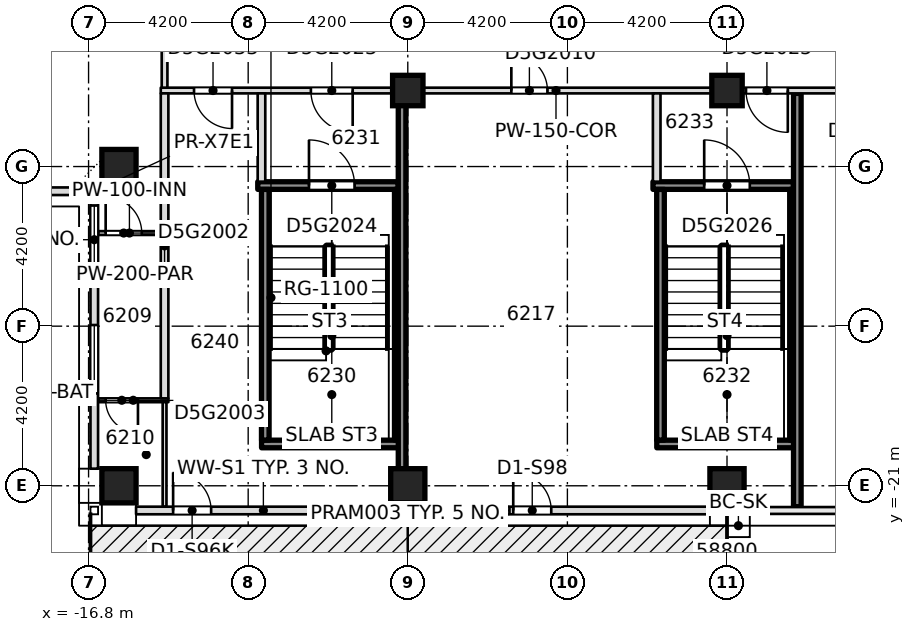
"""IFC4 building model, lengths in metres.
Left out: names, types, materials, properties, quantities, classifications, styles, units other than length and angle.
Written with IfcOpenShell. Run it as: python <this file> out.ifc"""

import sys

from ifc_helpers import new_model, si_unit, direction, frame, frame_2d, origin, origin_2d, place, context, subcontext, project, spatial, rectangle, extrude, element, fill, save


model = new_model("IFC4")
c1 = context("Model", 3, precision=1e-05, world=origin(), true_north=direction((0.0, 1.0)))
c2 = subcontext(c1, "Body", "Model", "MODEL_VIEW")
j1 = project(units=[si_unit("LENGTHUNIT", "METRE"), si_unit("PLANEANGLEUNIT", "RADIAN")], contexts=[c1])
p1 = place(None, origin())
s1 = spatial("IfcSite", under=j1, at=p1, CompositionType="ELEMENT")
p2 = place(p1, origin())
s2 = spatial("IfcBuilding", under=s1, at=p2, CompositionType="ELEMENT")
p3 = place(p2, frame((0.0, 0.0, 237.25)))
s3 = spatial("IfcBuildingStorey", under=s2, at=p3, CompositionType="ELEMENT", Elevation=237.25)
for number, where, z_axis, x_axis in (
    (1, (-16.0, -21.0, -0.4), (0.0, 0.0, 1.0), (1.0, 0.0, 0.0)),
    (2, (-8.4, -21.0, -0.4), (0.0, 0.0, 1.0), (1.0, 0.0, 0.0)),
    (3, (0.0, -21.0, -0.4), (0.0, 0.0, 1.0), (1.0, 0.0, 0.0)),
    (4, (-16.0, -12.6, -0.4), (0.0, 0.0, 1.0), (1.0, 0.0, 0.0)),
):
    element("IfcColumn", number, at=place(p3, frame(where, z_axis=z_axis, x_axis=x_axis)), inside=s3, PredefinedType="COLUMN", context=c2, shape_type="SweptSolid", body=[
        extrude(rectangle(XDim=0.9, YDim=0.9, at=origin_2d()), origin(), (0.0, 0.0, 1.0), 3.45),
    ])
for number, where, z_axis, x_axis in (
    (5, (-8.4, -10.6, -0.4), (0.0, 0.0, 1.0), (1.0, 0.0, 0.0)),
    (6, (0.0, -10.6, -0.4), (0.0, 0.0, 1.0), (1.0, 0.0, 0.0)),
):
    element("IfcColumn", number, at=place(p3, frame(where, z_axis=z_axis, x_axis=x_axis)), inside=s3, PredefinedType="COLUMN", context=c2, shape_type="SweptSolid", body=[
        extrude(rectangle(XDim=0.8, YDim=0.8, at=origin_2d()), origin(), (0.0, 0.0, 1.0), 3.45),
    ])
p4 = place(p3, frame((-12.248, -19.9, 0.0), z_axis=(0.0, 0.0, 1.0), x_axis=(1.0, 0.0, 0.0)))
e7 = element("IfcWall", 7, at=p4, inside=s3, PredefinedType="SOLIDWALL", context=c2, shape_type="SweptSolid", body=[
    extrude(rectangle(XDim=3.696, YDim=0.2, at=frame_2d((1.848, 0.0))), origin(), (0.0, 0.0, 1.0), 3.05),
])
p5 = place(p3, frame((-1.848, -19.9, 0.0), z_axis=(0.0, 0.0, 1.0), x_axis=(1.0, 0.0, 0.0)))
e8 = element("IfcWall", 8, at=p5, inside=s3, PredefinedType="SOLIDWALL", context=c2, shape_type="SweptSolid", body=[
    extrude(rectangle(XDim=3.696, YDim=0.2, at=frame_2d((1.848, 0.0))), origin(), (0.0, 0.0, 1.0), 3.05),
])
p6 = place(p3, frame((-16.55, -18.75, 0.0), z_axis=(0.0, 0.0, 1.0), x_axis=(1.0, 0.0, 0.0)))
e9 = element("IfcWall", 9, at=p6, inside=s3, PredefinedType="PARTITIONING", context=c2, shape_type="SweptSolid", body=[
    extrude(rectangle(XDim=1.85, YDim=0.1, at=frame_2d((0.925, 0.0))), origin(), (0.0, 0.0, 1.0), 3.05),
])
p7 = place(p6, frame((0.2, 0.0, 0.0)))
e10 = element("IfcOpeningElement", 10, at=p7, cuts=e9, PredefinedType="OPENING", context=c2, shape_type="SweptSolid", body=[
    extrude(rectangle(XDim=0.85, YDim=2.1, at=frame_2d((0.425, 1.05))), frame((0.0, 0.06, 0.0), z_axis=(0.0, -1.0, 0.0), x_axis=(1.0, 0.0, 0.0)), (0.0, 0.0, 1.0), 0.12),
])
p8 = place(p3, frame((-16.55, -14.35, 0.0), z_axis=(0.0, 0.0, 1.0), x_axis=(1.0, 0.0, 0.0)))
e11 = element("IfcWall", 11, at=p8, inside=s3, PredefinedType="PARTITIONING", context=c2, shape_type="SweptSolid", body=[
    extrude(rectangle(XDim=1.65, YDim=0.1, at=frame_2d((0.825, 0.0))), origin(), (0.0, 0.0, 1.0), 3.05),
])
p9 = place(p8, frame((0.2, 0.0, 0.0)))
e12 = element("IfcOpeningElement", 12, at=p9, cuts=e11, PredefinedType="OPENING", context=c2, shape_type="SweptSolid", body=[
    extrude(rectangle(XDim=0.95, YDim=2.1, at=frame_2d((0.475, 1.05))), frame((0.0, 0.06, 0.0), z_axis=(0.0, -1.0, 0.0), x_axis=(1.0, 0.0, 0.0)), (0.0, 0.0, 1.0), 0.12),
])
p10 = place(p3, frame((-12.348, -13.1, 0.0), z_axis=(0.0, 0.0, 1.0), x_axis=(1.0, 0.0, 0.0)))
e13 = element("IfcWall", 13, at=p10, inside=s3, PredefinedType="SOLIDWALL", context=c2, shape_type="SweptSolid", body=[
    extrude(rectangle(XDim=3.696, YDim=0.2, at=frame_2d((1.848, 0.0))), origin(), (0.0, 0.0, 1.0), 3.05),
])
p11 = place(p10, frame((1.348, 0.0, 0.0)))
e14 = element("IfcOpeningElement", 14, at=p11, cuts=e13, PredefinedType="OPENING", context=c2, shape_type="SweptSolid", body=[
    extrude(rectangle(XDim=1.2, YDim=2.1, at=frame_2d((0.6, 1.05))), frame((0.0, 0.11, 0.0), z_axis=(0.0, -1.0, 0.0), x_axis=(1.0, 0.0, 0.0)), (0.0, 0.0, 1.0), 0.22),
])
p12 = place(p3, frame((-1.948, -13.1, 0.0), z_axis=(0.0, 0.0, 1.0), x_axis=(1.0, 0.0, 0.0)))
e15 = element("IfcWall", 15, at=p12, inside=s3, PredefinedType="SOLIDWALL", context=c2, shape_type="SweptSolid", body=[
    extrude(rectangle(XDim=3.696, YDim=0.2, at=frame_2d((1.848, 0.0))), origin(), (0.0, 0.0, 1.0), 3.05),
])
p13 = place(p12, frame((1.348, 0.0, 0.0)))
e16 = element("IfcOpeningElement", 16, at=p13, cuts=e15, PredefinedType="OPENING", context=c2, shape_type="SweptSolid", body=[
    extrude(rectangle(XDim=1.2, YDim=2.1, at=frame_2d((0.6, 1.05))), frame((0.0, 0.11, 0.0), z_axis=(0.0, -1.0, 0.0), x_axis=(1.0, 0.0, 0.0)), (0.0, 0.0, 1.0), 0.22),
])
p14 = place(p3, frame((-14.9, -10.6, 0.0), z_axis=(0.0, 0.0, 1.0), x_axis=(1.0, 0.0, 0.0)))
e17 = element("IfcWall", 17, at=p14, inside=s3, PredefinedType="PARTITIONING", context=c2, shape_type="SweptSolid", body=[
    extrude(rectangle(XDim=20.8, YDim=0.15, at=frame_2d((10.4, 0.0))), origin(), (0.0, 0.0, 1.0), 3.05),
])
p15 = place(p14, frame((9.225, 0.0, 0.0)))
e18 = element("IfcOpeningElement", 18, at=p15, cuts=e17, PredefinedType="OPENING", context=c2, shape_type="SweptSolid", body=[
    extrude(rectangle(XDim=0.95, YDim=2.1, at=frame_2d((0.475, 1.05))), frame((0.0, 0.085, 0.0), z_axis=(0.0, -1.0, 0.0), x_axis=(1.0, 0.0, 0.0)), (0.0, 0.0, 1.0), 0.17),
])
p16 = place(p14, frame((18.275, 0.0, 0.0)))
e19 = element("IfcOpeningElement", 19, at=p16, cuts=e17, PredefinedType="OPENING", context=c2, shape_type="SweptSolid", body=[
    extrude(rectangle(XDim=0.95, YDim=2.1, at=frame_2d((0.475, 1.05))), frame((0.0, 0.085, 0.0), z_axis=(0.0, -1.0, 0.0), x_axis=(1.0, 0.0, 0.0)), (0.0, 0.0, 1.0), 0.17),
])
p17 = place(p14, frame((3.95, 0.0, 0.0)))
e20 = element("IfcOpeningElement", 20, at=p17, cuts=e17, PredefinedType="OPENING", context=c2, shape_type="SweptSolid", body=[
    extrude(rectangle(XDim=1.1, YDim=2.1, at=frame_2d((0.55, 1.05))), frame((0.0, 0.085, 0.0), z_axis=(0.0, -1.0, 0.0), x_axis=(1.0, 0.0, 0.0)), (0.0, 0.0, 1.0), 0.17),
])
p18 = place(p14, frame((15.4, 0.0, 0.0)))
e21 = element("IfcOpeningElement", 21, at=p18, cuts=e17, PredefinedType="OPENING", context=c2, shape_type="SweptSolid", body=[
    extrude(rectangle(XDim=1.1, YDim=2.1, at=frame_2d((0.55, 1.05))), frame((0.0, 0.085, 0.0), z_axis=(0.0, -1.0, 0.0), x_axis=(1.0, 0.0, 0.0)), (0.0, 0.0, 1.0), 0.17),
])
p19 = place(p14, frame((0.875, 0.0, 0.0)))
e22 = element("IfcOpeningElement", 22, at=p19, cuts=e17, PredefinedType="OPENING", context=c2, shape_type="SweptSolid", body=[
    extrude(rectangle(XDim=1.0, YDim=2.1, at=frame_2d((0.5, 1.05))), frame((0.0, 0.085, 0.0), z_axis=(0.0, -1.0, 0.0), x_axis=(1.0, 0.0, 0.0)), (0.0, 0.0, 1.0), 0.17),
])
p20 = place(p3, frame((-14.8, -21.55, 0.0), z_axis=(0.0, 0.0, 1.0), x_axis=(0.0, 1.0, 0.0)))
e23 = element("IfcWall", 23, at=p20, inside=s3, PredefinedType="PARTITIONING", context=c2, shape_type="SweptSolid", body=[
    extrude(rectangle(XDim=2.75, YDim=0.1, at=frame_2d((1.375, 0.0))), origin(), (0.0, 0.0, 1.0), 3.05),
])
p21 = place(p3, frame((-14.8, -18.7, 0.0), z_axis=(0.0, 0.0, 1.0), x_axis=(0.0, 1.0, 0.0)))
e24 = element("IfcWall", 24, at=p21, inside=s3, PredefinedType="PARTITIONING", context=c2, shape_type="SweptSolid", body=[
    extrude(rectangle(XDim=8.025, YDim=0.2, at=frame_2d((4.012, 0.0))), origin(), (0.0, 0.0, 1.0), 3.05),
])
p22 = place(p3, frame((-14.8, -10.525, 0.0), z_axis=(0.0, 0.0, 1.0), x_axis=(0.0, 1.0, 0.0)))
e25 = element("IfcWall", 25, at=p22, inside=s3, PredefinedType="PARTITIONING", context=c2, shape_type="SweptSolid", body=[
    extrude(rectangle(XDim=3.05, YDim=0.15, at=frame_2d((1.525, 0.0))), origin(), (0.0, 0.0, 1.0), 3.05),
])
p23 = place(p3, frame((-12.25, -12.998, 0.0), z_axis=(0.0, 0.0, 1.0), x_axis=(0.0, 1.0, 0.0)))
e26 = element("IfcWall", 26, at=p23, inside=s3, PredefinedType="PARTITIONING", context=c2, shape_type="SweptSolid", body=[
    extrude(rectangle(XDim=2.323, YDim=0.2, at=frame_2d((1.162, 0.0))), origin(), (0.0, 0.0, 1.0), 3.05),
])
for number, where, z_axis, x_axis in (
    (27, (-12.15, -19.798, 0.0), (0.0, 0.0, 1.0), (0.0, 1.0, 0.0)),
    (28, (-8.65, -19.798, 0.0), (0.0, 0.0, 1.0), (0.0, 1.0, 0.0)),
):
    element("IfcWall", number, at=place(p3, frame(where, z_axis=z_axis, x_axis=x_axis)), inside=s3, PredefinedType="SOLIDWALL", context=c2, shape_type="SweptSolid", body=[
        extrude(rectangle(XDim=6.596, YDim=0.2, at=frame_2d((3.298, 0.0))), origin(), (0.0, 0.0, 1.0), 3.05),
    ])
p24 = place(p3, frame((-1.85, -12.998, 0.0), z_axis=(0.0, 0.0, 1.0), x_axis=(0.0, 1.0, 0.0)))
e29 = element("IfcWall", 29, at=p24, inside=s3, PredefinedType="PARTITIONING", context=c2, shape_type="SweptSolid", body=[
    extrude(rectangle(XDim=2.323, YDim=0.2, at=frame_2d((1.162, 0.0))), origin(), (0.0, 0.0, 1.0), 3.05),
])
for number, where, z_axis, x_axis in (
    (30, (-1.75, -19.798, 0.0), (0.0, 0.0, 1.0), (0.0, 1.0, 0.0)),
    (31, (1.75, -19.798, 0.0), (0.0, 0.0, 1.0), (0.0, 1.0, 0.0)),
):
    element("IfcWall", number, at=place(p3, frame(where, z_axis=z_axis, x_axis=x_axis)), inside=s3, PredefinedType="SOLIDWALL", context=c2, shape_type="SweptSolid", body=[
        extrude(rectangle(XDim=6.596, YDim=0.2, at=frame_2d((3.298, 0.0))), origin(), (0.0, 0.0, 1.0), 3.05),
    ])
p25 = place(p3, frame((-15.55, -21.65, 0.0), z_axis=(0.0, 0.0, 1.0), x_axis=(1.0, 0.0, 0.0)))
e32 = element("IfcWall", 32, at=p25, inside=s3, PredefinedType="STANDARD", context=c2, shape_type="SweptSolid", body=[
    extrude(rectangle(XDim=6.7, YDim=0.2, at=frame_2d((3.35, 0.0))), origin(), (0.0, 0.0, 1.0), 3.05),
])
p26 = place(p25, frame((0.975, 0.0, 0.0)))
e33 = element("IfcOpeningElement", 33, at=p26, cuts=e32, PredefinedType="OPENING", context=c2, shape_type="SweptSolid", body=[
    extrude(rectangle(XDim=1.0, YDim=2.4, at=frame_2d((0.5, 1.2))), frame((0.0, 0.11, 0.0), z_axis=(0.0, -1.0, 0.0), x_axis=(1.0, 0.0, 0.0)), (0.0, 0.0, 1.0), 0.22),
])
p27 = place(p3, frame((-7.95, -21.65, 0.0), z_axis=(0.0, 0.0, 1.0), x_axis=(1.0, 0.0, 0.0)))
e34 = element("IfcWall", 34, at=p27, inside=s3, PredefinedType="STANDARD", context=c2, shape_type="SweptSolid", body=[
    extrude(rectangle(XDim=7.5, YDim=0.2, at=frame_2d((3.75, 0.0))), origin(), (0.0, 0.0, 1.0), 3.05),
])
p28 = place(p27, frame((0.425, 0.0, 0.2)))
e35 = element("IfcOpeningElement", 35, at=p28, cuts=e34, PredefinedType="OPENING", context=c2, shape_type="SweptSolid", body=[
    extrude(rectangle(XDim=1.8, YDim=2.65, at=frame_2d((0.9, 1.325))), frame((0.0, 0.11, 0.0), z_axis=(0.0, -1.0, 0.0), x_axis=(1.0, 0.0, 0.0)), (0.0, 0.0, 1.0), 0.22),
])
p29 = place(p27, frame((2.325, 0.0, 0.0)))
e36 = element("IfcOpeningElement", 36, at=p29, cuts=e34, PredefinedType="OPENING", context=c2, shape_type="SweptSolid", body=[
    extrude(rectangle(XDim=1.0, YDim=2.4, at=frame_2d((0.5, 1.2))), frame((0.0, 0.11, 0.0), z_axis=(0.0, -1.0, 0.0), x_axis=(1.0, 0.0, 0.0)), (0.0, 0.0, 1.0), 0.22),
])
p30 = place(p3, frame((-24.75, -13.25, 0.0), z_axis=(0.0, 0.0, 1.0), x_axis=(1.0, 0.0, 0.0)))
e37 = element("IfcWall", 37, at=p30, inside=s3, PredefinedType="STANDARD", context=c2, shape_type="SweptSolid", body=[
    extrude(rectangle(XDim=8.0, YDim=0.2, at=frame_2d((4.0, 0.0))), origin(), (0.0, 0.0, 1.0), 3.05),
])
p31 = place(p3, frame((-16.65, -13.35, 0.0), z_axis=(0.0, 0.0, 1.0), x_axis=(0.0, -1.0, 0.0)))
e38 = element("IfcWall", 38, at=p31, inside=s3, PredefinedType="STANDARD", context=c2, shape_type="SweptSolid", body=[
    extrude(rectangle(XDim=7.2, YDim=0.2, at=frame_2d((3.6, 0.0))), origin(), (0.0, 0.0, 1.0), 3.05),
])
p32 = place(p31, frame((3.42, 0.0, 0.2)))
e39 = element("IfcOpeningElement", 39, at=p32, cuts=e38, PredefinedType="OPENING", context=c2, shape_type="SweptSolid", body=[
    extrude(rectangle(XDim=1.8, YDim=2.65, at=frame_2d((0.9, 1.325))), frame((0.0, 0.11, 0.0), z_axis=(0.0, -1.0, 0.0), x_axis=(1.0, 0.0, 0.0)), (0.0, 0.0, 1.0), 0.22),
])
p33 = place(p31, frame((0.275, 0.0, 0.2)))
e40 = element("IfcOpeningElement", 40, at=p33, cuts=e38, PredefinedType="OPENING", context=c2, shape_type="SweptSolid", body=[
    extrude(rectangle(XDim=1.8, YDim=2.65, at=frame_2d((0.9, 1.325))), frame((0.0, 0.11, 0.0), z_axis=(0.0, -1.0, 0.0), x_axis=(1.0, 0.0, 0.0)), (0.0, 0.0, 1.0), 0.22),
])
for number, where, z_axis, x_axis in (
    (41, (1.85, -21.55, 0.0), (0.0, 0.0, 1.0), (0.0, 1.0, 0.0)),
    (42, (-8.55, -21.55, 0.0), (0.0, 0.0, 1.0), (0.0, 1.0, 0.0)),
):
    element("IfcWall", number, at=place(p3, frame(where, z_axis=z_axis, x_axis=x_axis)), inside=s3, PredefinedType="SOLIDWALL", context=c2, shape_type="SweptSolid", body=[
        extrude(rectangle(XDim=10.875, YDim=0.2, at=frame_2d((5.438, 0.0))), origin(), (0.0, 0.0, 1.0), 3.05),
    ])
p34 = place(p9, origin())
e43 = element("IfcDoor", 43, at=p34, inside=s3, OperationType="SINGLE_SWING_RIGHT", PredefinedType="DOOR", context=c2, shape_type="SweptSolid", body=[
    extrude(rectangle(XDim=0.95, YDim=2.1, at=frame_2d((0.475, 1.05))), frame((0.0, 0.025, 0.0), z_axis=(0.0, -1.0, 0.0), x_axis=(1.0, 0.0, 0.0)), (0.0, 0.0, 1.0), 0.05),
])
fill(e12, e43)
p35 = place(p7, origin())
e44 = element("IfcDoor", 44, at=p35, inside=s3, OperationType="SINGLE_SWING_RIGHT", PredefinedType="DOOR", context=c2, shape_type="SweptSolid", body=[
    extrude(rectangle(XDim=0.85, YDim=2.1, at=frame_2d((0.425, 1.05))), frame((0.0, 0.025, 0.0), z_axis=(0.0, -1.0, 0.0), x_axis=(1.0, 0.0, 0.0)), (0.0, 0.0, 1.0), 0.05),
])
fill(e10, e44)
p36 = place(p15, origin())
e45 = element("IfcDoor", 45, at=p36, inside=s3, OperationType="SINGLE_SWING_LEFT", PredefinedType="DOOR", context=c2, shape_type="SweptSolid", body=[
    extrude(rectangle(XDim=0.95, YDim=2.1, at=frame_2d((0.475, 1.05))), frame((0.0, 0.025, 0.0), z_axis=(0.0, -1.0, 0.0), x_axis=(1.0, 0.0, 0.0)), (0.0, 0.0, 1.0), 0.05),
])
fill(e18, e45)
p37 = place(p17, origin())
e46 = element("IfcDoor", 46, at=p37, inside=s3, OperationType="SINGLE_SWING_RIGHT", PredefinedType="DOOR", context=c2, shape_type="SweptSolid", body=[
    extrude(rectangle(XDim=1.1, YDim=2.1, at=frame_2d((0.55, 1.05))), frame((0.0, 0.025, 0.0), z_axis=(0.0, -1.0, 0.0), x_axis=(1.0, 0.0, 0.0)), (0.0, 0.0, 1.0), 0.05),
])
fill(e20, e46)
p38 = place(p11, origin())
e47 = element("IfcDoor", 47, at=p38, inside=s3, OperationType="SINGLE_SWING_RIGHT", PredefinedType="DOOR", context=c2, shape_type="SweptSolid", body=[
    extrude(rectangle(XDim=1.2, YDim=2.1, at=frame_2d((0.6, 1.05))), frame((0.0, 0.025, 0.0), z_axis=(0.0, -1.0, 0.0), x_axis=(1.0, 0.0, 0.0)), (0.0, 0.0, 1.0), 0.05),
])
fill(e14, e47)
p39 = place(p18, origin())
e48 = element("IfcDoor", 48, at=p39, inside=s3, OperationType="SINGLE_SWING_LEFT", PredefinedType="DOOR", context=c2, shape_type="SweptSolid", body=[
    extrude(rectangle(XDim=1.1, YDim=2.1, at=frame_2d((0.55, 1.05))), frame((0.0, 0.025, 0.0), z_axis=(0.0, -1.0, 0.0), x_axis=(1.0, 0.0, 0.0)), (0.0, 0.0, 1.0), 0.05),
])
fill(e21, e48)
p40 = place(p13, origin())
e49 = element("IfcDoor", 49, at=p40, inside=s3, OperationType="SINGLE_SWING_RIGHT", PredefinedType="DOOR", context=c2, shape_type="SweptSolid", body=[
    extrude(rectangle(XDim=1.2, YDim=2.1, at=frame_2d((0.6, 1.05))), frame((0.0, 0.025, 0.0), z_axis=(0.0, -1.0, 0.0), x_axis=(1.0, 0.0, 0.0)), (0.0, 0.0, 1.0), 0.05),
])
fill(e16, e49)
p41 = place(p19, origin())
e50 = element("IfcDoor", 50, at=p41, inside=s3, OperationType="SINGLE_SWING_RIGHT", PredefinedType="DOOR", context=c2, shape_type="SweptSolid", body=[
    extrude(rectangle(XDim=1.0, YDim=2.1, at=frame_2d((0.5, 1.05))), frame((0.0, 0.025, 0.0), z_axis=(0.0, -1.0, 0.0), x_axis=(1.0, 0.0, 0.0)), (0.0, 0.0, 1.0), 0.05),
])
fill(e22, e50)
p42 = place(p28, origin())
e51 = element("IfcWindow", 51, at=p42, inside=s3, PartitioningType="SINGLE_PANEL", PredefinedType="WINDOW", context=c2, shape_type="SweptSolid", body=[
    extrude(rectangle(XDim=1.8, YDim=2.65, at=frame_2d((0.9, 1.325))), frame((0.0, 0.03, 0.0), z_axis=(0.0, -1.0, 0.0), x_axis=(1.0, 0.0, 0.0)), (0.0, 0.0, 1.0), 0.06),
])
fill(e35, e51)
p43 = place(p29, origin())
e52 = element("IfcDoor", 52, at=p43, inside=s3, OperationType="SINGLE_SWING_LEFT", PredefinedType="DOOR", context=c2, shape_type="SweptSolid", body=[
    extrude(rectangle(XDim=1.0, YDim=2.4, at=frame_2d((0.5, 1.2))), frame((0.0, 0.025, 0.0), z_axis=(0.0, -1.0, 0.0), x_axis=(1.0, 0.0, 0.0)), (0.0, 0.0, 1.0), 0.05),
])
fill(e36, e52)
p44 = place(p26, origin())
e53 = element("IfcDoor", 53, at=p44, inside=s3, OperationType="SINGLE_SWING_LEFT", PredefinedType="DOOR", context=c2, shape_type="SweptSolid", body=[
    extrude(rectangle(XDim=1.0, YDim=2.4, at=frame_2d((0.5, 1.2))), frame((0.0, 0.025, 0.0), z_axis=(0.0, -1.0, 0.0), x_axis=(1.0, 0.0, 0.0)), (0.0, 0.0, 1.0), 0.05),
])
fill(e33, e53)
p45 = place(p32, origin())
e54 = element("IfcWindow", 54, at=p45, inside=s3, PartitioningType="SINGLE_PANEL", PredefinedType="WINDOW", context=c2, shape_type="SweptSolid", body=[
    extrude(rectangle(XDim=1.8, YDim=2.65, at=frame_2d((0.9, 1.325))), frame((0.0, 0.03, 0.0), z_axis=(0.0, -1.0, 0.0), x_axis=(1.0, 0.0, 0.0)), (0.0, 0.0, 1.0), 0.06),
])
fill(e39, e54)
p46 = place(p33, origin())
e55 = element("IfcWindow", 55, at=p46, inside=s3, PartitioningType="SINGLE_PANEL", PredefinedType="WINDOW", context=c2, shape_type="SweptSolid", body=[
    extrude(rectangle(XDim=1.8, YDim=2.65, at=frame_2d((0.9, 1.325))), frame((0.0, 0.03, 0.0), z_axis=(0.0, -1.0, 0.0), x_axis=(1.0, 0.0, 0.0)), (0.0, 0.0, 1.0), 0.06),
])
fill(e40, e55)
save(model, sys.argv[1])
